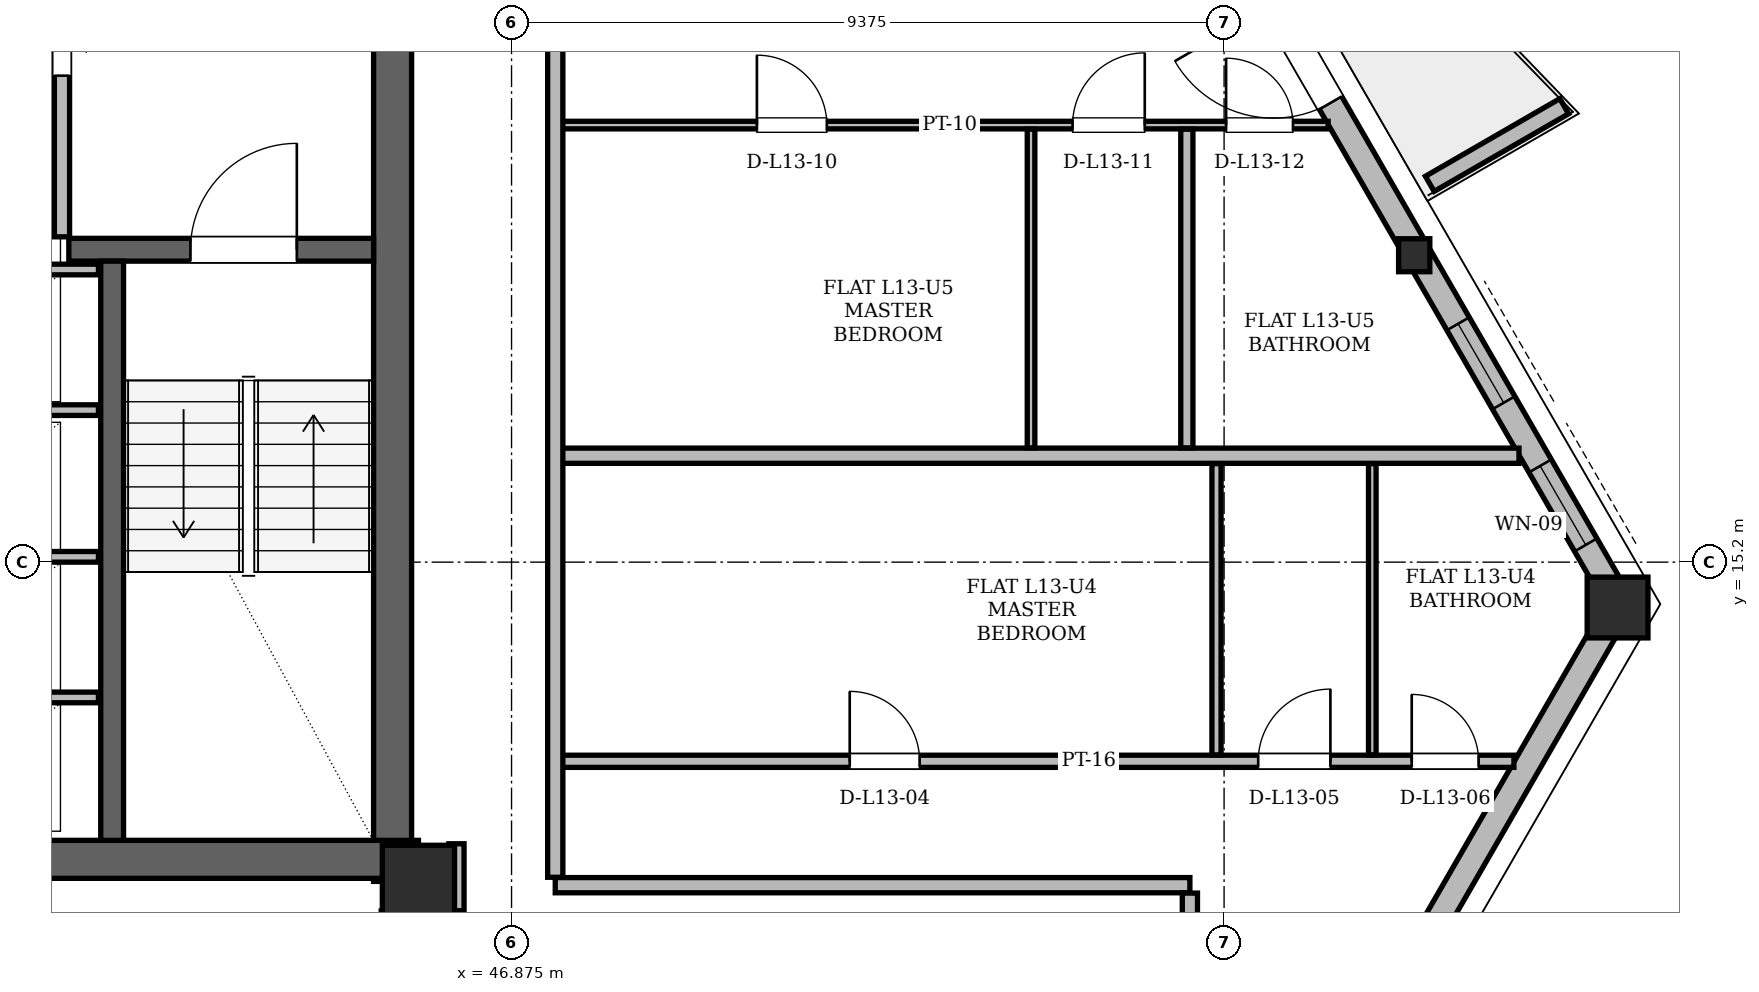
"""IFC4 building model, lengths in metres.
Left out: names, types, materials, properties, quantities, classifications, styles, units other than length and angle.
Written with IfcOpenShell. Run it as: python <this file> out.ifc"""

import sys

from ifc_helpers import new_model, si_unit, direction, frame, frame_2d, origin, origin_2d, place, context, subcontext, project, spatial, polyline, rectangle, hollow_rectangle, i_section, outline, extrude, element, fill, save


model = new_model("IFC4")
c1 = context("Model", 3, precision=1e-05, world=origin(), true_north=direction((0.0, 1.0)))
c2 = subcontext(c1, "Body", "Model", "MODEL_VIEW")
j1 = project(units=[si_unit("LENGTHUNIT", "METRE"), si_unit("PLANEANGLEUNIT", "RADIAN")], contexts=[c1])
p1 = place(None, origin())
s1 = spatial("IfcSite", under=j1, at=p1, CompositionType="ELEMENT")
p2 = place(p1, origin())
s2 = spatial("IfcBuilding", under=s1, at=p2, CompositionType="ELEMENT")
p3 = place(p2, frame((0.0, 0.0, 52.5)))
s3 = spatial("IfcBuildingStorey", under=s2, at=p3, CompositionType="ELEMENT", Elevation=52.5)
p4 = place(p3, frame((45.65, 11.0, 0.0), z_axis=(0.0, 0.0, 1.0), x_axis=(1.0, 0.0, 0.0)))
e1 = element("IfcColumn", 1, at=p4, inside=s3, PredefinedType="COLUMN", context=c2, shape_type="SweptSolid", body=[
    extrude(hollow_rectangle(XDim=0.95, YDim=0.95, WallThickness=0.08, at=origin_2d()), origin(), (0.0, 0.0, 1.0), 3.6),
])
p5 = place(p3, frame((61.458, 14.648, 0.004), z_axis=(-0.017328387348, -0.024803377969, 0.999542154906), x_axis=(0.819759137879, -0.572708438792, 0.0)))
e2 = element("IfcColumn", 2, at=p5, inside=s3, PredefinedType="COLUMN", context=c2, shape_type="SweptSolid", body=[
    extrude(hollow_rectangle(XDim=0.8, YDim=0.8, WallThickness=0.065, at=origin_2d()), origin(), (0.0, 0.0, 1.0), 3.593),
])
p6 = place(p3, frame((58.786, 19.276, 0.004), z_axis=(-0.019435833203, -0.021202727131, 0.999586260785), x_axis=(0.737154140201, -0.675724628517, 0.0)))
e3 = element("IfcColumn", 3, at=p6, inside=s3, PredefinedType="COLUMN", context=c2, shape_type="SweptSolid", body=[
    extrude(i_section(OverallWidth=0.411, OverallDepth=0.434, WebThickness=0.036, FlangeThickness=0.057, at=origin_2d()), origin(), (0.0, 0.0, 1.0), 3.593),
])
p7 = place(p3, frame((45.31, 11.0, 0.0), z_axis=(0.0, 0.0, 1.0), x_axis=(0.0, 1.0, 0.0)))
e4 = element("IfcWall", 4, at=p7, inside=s3, PredefinedType="SHEAR", context=c2, shape_type="SweptSolid", body=[
    extrude(rectangle(XDim=13.3, YDim=0.5, at=frame_2d((6.65, 0.0))), origin(), (0.0, 0.0, 1.0), 3.36),
])
p8 = place(p3, frame((38.55, 11.29, 0.0), z_axis=(0.0, 0.0, 1.0), x_axis=(1.0, 0.0, 0.0)))
e5 = element("IfcWall", 5, at=p8, inside=s3, PredefinedType="SHEAR", context=c2, shape_type="SweptSolid", body=[
    extrude(rectangle(XDim=7.1, YDim=0.5, at=frame_2d((3.55, 0.0))), origin(), (0.0, 0.0, 1.0), 3.36),
])
p9 = place(p3, frame((41.05, 19.31, 0.0), z_axis=(0.0, 0.0, 1.0), x_axis=(1.0, 0.0, 0.0)))
e6 = element("IfcWall", 6, at=p9, inside=s3, PredefinedType="SHEAR", context=c2, shape_type="SweptSolid", body=[
    extrude(rectangle(XDim=4.01, YDim=0.3, at=frame_2d((2.005, 0.0))), origin(), (0.0, 0.0, 1.0), 3.36),
])
p10 = place(p9, frame((1.6, 0.0, 0.0)))
e7 = element("IfcOpeningElement", 7, at=p10, cuts=e6, PredefinedType="OPENING", context=c2, shape_type="SweptSolid", body=[
    extrude(rectangle(XDim=1.4, YDim=2.2, at=frame_2d((0.7, 1.1))), frame((0.0, 0.15, 0.0), z_axis=(0.0, -1.0, 0.0), x_axis=(1.0, 0.0, 0.0)), (0.0, 0.0, 1.0), 0.3),
])
p11 = place(p3, frame((41.62, 11.54, 0.0), z_axis=(0.0, 0.0, 1.0), x_axis=(0.0, 1.0, 0.0)))
e8 = element("IfcWall", 8, at=p11, inside=s3, PredefinedType="SHEAR", context=c2, shape_type="SweptSolid", body=[
    extrude(rectangle(XDim=7.62, YDim=0.3, at=frame_2d((3.81, 0.0))), origin(), (0.0, 0.0, 1.0), 3.36),
])
p12 = place(p3, frame((54.201, 2.078, 0.0), z_axis=(0.0, 0.0, 1.0), x_axis=(0.49999957979, 0.866025646392, 0.0)))
e9 = element("IfcWall", 9, at=p12, inside=s3, PredefinedType="SOLIDWALL", context=c2, shape_type="SweptSolid", body=[
    extrude(rectangle(XDim=14.515, YDim=0.34, at=frame_2d((7.257, 0.0))), origin(), (0.0, 0.0, 1.0), 2.494),
])
p13 = place(p3, frame((61.458, 14.648, 0.0), z_axis=(0.0, 0.0, 1.0), x_axis=(-0.500001264705, 0.866024673605, 0.0)))
e10 = element("IfcWall", 10, at=p13, inside=s3, PredefinedType="SOLIDWALL", context=c2, shape_type="SweptSolid", body=[
    extrude(rectangle(XDim=33.402, YDim=0.34, at=frame_2d((16.701, 0.0))), origin(), (0.0, 0.0, 1.0), 2.494),
])
p14 = place(p13, frame((7.615, 0.0, 0.0)))
e11 = element("IfcOpeningElement", 11, at=p14, cuts=e10, PredefinedType="OPENING", context=c2, shape_type="SweptSolid", body=[
    extrude(rectangle(XDim=1.5, YDim=2.2, at=frame_2d((0.75, 1.1))), frame((0.0, 0.17, 0.0), z_axis=(0.0, -1.0, 0.0), x_axis=(1.0, 0.0, 0.0)), (0.0, 0.0, 1.0), 0.34),
])
p15 = place(p13, frame((24.692, 0.0, 0.0)))
e12 = element("IfcOpeningElement", 12, at=p15, cuts=e10, PredefinedType="OPENING", context=c2, shape_type="SweptSolid", body=[
    extrude(rectangle(XDim=1.5, YDim=2.2, at=frame_2d((0.75, 1.1))), frame((0.0, 0.17, 0.0), z_axis=(0.0, -1.0, 0.0), x_axis=(1.0, 0.0, 0.0)), (0.0, 0.0, 1.0), 0.34),
])
p16 = place(p13, frame((0.899, 0.0, 0.85)))
e13 = element("IfcOpeningElement", 13, at=p16, cuts=e10, PredefinedType="OPENING", context=c2, shape_type="SweptSolid", body=[
    extrude(rectangle(XDim=1.2, YDim=1.48, at=frame_2d((0.6, 0.74))), frame((0.0, 0.17, 0.0), z_axis=(0.0, -1.0, 0.0), x_axis=(1.0, 0.0, 0.0)), (0.0, 0.0, 1.0), 0.34),
])
p17 = place(p13, frame((10.882, 0.0, 0.85)))
e14 = element("IfcOpeningElement", 14, at=p17, cuts=e10, PredefinedType="OPENING", context=c2, shape_type="SweptSolid", body=[
    extrude(rectangle(XDim=1.6, YDim=1.534, at=frame_2d((0.8, 0.767))), frame((0.0, 0.17, 0.0), z_axis=(0.0, -1.0, 0.0), x_axis=(1.0, 0.0, 0.0)), (0.0, 0.0, 1.0), 0.34),
])
p18 = place(p13, frame((18.551, 0.0, 0.85)))
e15 = element("IfcOpeningElement", 15, at=p18, cuts=e10, PredefinedType="OPENING", context=c2, shape_type="SweptSolid", body=[
    extrude(rectangle(XDim=3.0, YDim=1.534, at=frame_2d((1.5, 0.767))), frame((0.0, 0.17, 0.0), z_axis=(0.0, -1.0, 0.0), x_axis=(1.0, 0.0, 0.0)), (0.0, 0.0, 1.0), 0.34),
])
p19 = place(p13, frame((3.059, 0.0, 0.85)))
e16 = element("IfcOpeningElement", 16, at=p19, cuts=e10, PredefinedType="OPENING", context=c2, shape_type="SweptSolid", body=[
    extrude(rectangle(XDim=1.2, YDim=1.48, at=frame_2d((0.6, 0.74))), frame((0.0, 0.17, 0.0), z_axis=(0.0, -1.0, 0.0), x_axis=(1.0, 0.0, 0.0)), (0.0, 0.0, 1.0), 0.34),
])
p20 = place(p3, frame((58.956, 20.177, 0.0), z_axis=(0.0, 0.0, 1.0), x_axis=(0.866042246008, 0.499970827278, 0.0)))
e17 = element("IfcWall", 17, at=p20, inside=s3, PredefinedType="PARAPET", context=c2, shape_type="SweptSolid", body=[
    extrude(outline(polyline([(0.0, 0.0), (2.042, 0.0), (2.042, 1.1), (0.0, 1.32), (0.0, 0.0)])), frame((0.0, 0.115, 0.0), z_axis=(0.0, -1.0, 0.0), x_axis=(1.0, 0.0, 0.0)), (0.0, 0.0, 1.0), 0.23),
])
p21 = place(p3, frame((40.96, 19.48, 0.0), z_axis=(0.0, 0.0, 1.0), x_axis=(0.0, 1.0, 0.0)))
e18 = element("IfcWall", 18, at=p21, inside=s3, PredefinedType="PARTITIONING", context=c2, shape_type="SweptSolid", body=[
    extrude(rectangle(XDim=4.5, YDim=0.2, at=frame_2d((2.25, 0.0))), origin(), (0.0, 0.0, 1.0), 2.4),
])
p22 = place(p21, frame((2.12, 0.0, 0.0)))
e19 = element("IfcOpeningElement", 19, at=p22, cuts=e18, PredefinedType="OPENING", context=c2, shape_type="SweptSolid", body=[
    extrude(rectangle(XDim=1.1, YDim=2.2, at=frame_2d((0.55, 1.1))), frame((0.0, 0.1, 0.0), z_axis=(0.0, -1.0, 0.0), x_axis=(1.0, 0.0, 0.0)), (0.0, 0.0, 1.0), 0.2),
])
p23 = place(p3, frame((39.26, 20.86, 0.0), z_axis=(0.0, 0.0, 1.0), x_axis=(1.0, 0.0, 0.0)))
e20 = element("IfcWall", 20, at=p23, inside=s3, PredefinedType="PARTITIONING", context=c2, shape_type="SweptSolid", body=[
    extrude(rectangle(XDim=1.58, YDim=0.18, at=frame_2d((0.79, 0.0))), origin(), (0.0, 0.0, 1.0), 3.36),
])
for number, where, z_axis, x_axis in (
    (21, (38.78, 13.42, 0.0), (0.0, 0.0, 1.0), (1.0, 0.0, 0.0)),
    (22, (38.78, 15.27, 0.0), (0.0, 0.0, 1.0), (1.0, 0.0, 0.0)),
    (23, (38.78, 17.2, 0.0), (0.0, 0.0, 1.0), (1.0, 0.0, 0.0)),
    (24, (38.78, 19.05, 0.0), (0.0, 0.0, 1.0), (1.0, 0.0, 0.0)),
):
    element("IfcWall", number, at=place(p3, frame(where, z_axis=z_axis, x_axis=x_axis)), inside=s3, PredefinedType="PARTITIONING", context=c2, shape_type="SweptSolid", body=[
        extrude(rectangle(XDim=2.66, YDim=0.14, at=frame_2d((1.33, 0.0))), origin(), (0.0, 0.0, 1.0), 3.36),
    ])
p24 = place(p3, frame((45.16, 10.51, 0.0), z_axis=(0.0, 0.0, 1.0), x_axis=(1.0, 0.0, 0.0)))
e25 = element("IfcWall", 25, at=p24, inside=s3, PredefinedType="PARTITIONING", context=c2, shape_type="SweptSolid", body=[
    extrude(rectangle(XDim=0.98, YDim=0.2, at=frame_2d((0.49, 0.0))), origin(), (0.0, 0.0, 1.0), 2.738),
])
p25 = place(p3, frame((47.45, 10.95, 0.0), z_axis=(0.0, 0.0, 1.0), x_axis=(1.0, 0.0, 0.0)))
e26 = element("IfcWall", 26, at=p25, inside=s3, PredefinedType="PARTITIONING", context=c2, shape_type="SweptSolid", body=[
    extrude(rectangle(XDim=8.35, YDim=0.2, at=frame_2d((4.175, 0.0))), origin(), (0.0, 0.0, 1.0), 3.36),
])
p26 = place(p3, frame((47.4, 12.58, 0.0), z_axis=(0.0, 0.0, 1.0), x_axis=(1.0, 0.0, 0.0)))
e27 = element("IfcWall", 27, at=p26, inside=s3, PredefinedType="PARTITIONING", context=c2, shape_type="SweptSolid", body=[
    extrude(rectangle(XDim=12.664, YDim=0.16, at=frame_2d((6.332, 0.0))), origin(), (0.0, 0.0, 1.0), 2.738),
])
p27 = place(p26, frame((3.924, 0.0, 0.0)))
e28 = element("IfcOpeningElement", 28, at=p27, cuts=e27, PredefinedType="OPENING", context=c2, shape_type="SweptSolid", body=[
    extrude(rectangle(XDim=0.92, YDim=2.12, at=frame_2d((0.46, 1.06))), frame((0.0, 0.08, 0.0), z_axis=(0.0, -1.0, 0.0), x_axis=(1.0, 0.0, 0.0)), (0.0, 0.0, 1.0), 0.16),
])
p28 = place(p26, frame((9.299, 0.0, 0.0)))
e29 = element("IfcOpeningElement", 29, at=p28, cuts=e27, PredefinedType="OPENING", context=c2, shape_type="SweptSolid", body=[
    extrude(rectangle(XDim=0.95, YDim=2.1, at=frame_2d((0.475, 1.05))), frame((0.0, 0.08, 0.0), z_axis=(0.0, -1.0, 0.0), x_axis=(1.0, 0.0, 0.0)), (0.0, 0.0, 1.0), 0.16),
])
p29 = place(p26, frame((11.319, 0.0, 0.0)))
e30 = element("IfcOpeningElement", 30, at=p29, cuts=e27, PredefinedType="OPENING", context=c2, shape_type="SweptSolid", body=[
    extrude(rectangle(XDim=0.88, YDim=2.08, at=frame_2d((0.44, 1.04))), frame((0.0, 0.08, 0.0), z_axis=(0.0, -1.0, 0.0), x_axis=(1.0, 0.0, 0.0)), (0.0, 0.0, 1.0), 0.16),
])
p30 = place(p3, frame((47.45, 16.6, 0.0), z_axis=(0.0, 0.0, 1.0), x_axis=(1.0, 0.0, 0.0)))
e31 = element("IfcWall", 31, at=p30, inside=s3, PredefinedType="PARTITIONING", context=c2, shape_type="SweptSolid", body=[
    extrude(rectangle(XDim=12.68, YDim=0.2, at=frame_2d((6.34, 0.0))), origin(), (0.0, 0.0, 1.0), 2.494),
])
p31 = place(p3, frame((47.4, 20.95, 0.0), z_axis=(0.0, 0.0, 1.0), x_axis=(1.0, 0.0, 0.0)))
e32 = element("IfcWall", 32, at=p31, inside=s3, PredefinedType="PARTITIONING", context=c2, shape_type="SweptSolid", body=[
    extrude(rectangle(XDim=10.219, YDim=0.1, at=frame_2d((5.109, 0.0))), origin(), (0.0, 0.0, 1.0), 3.36),
])
p32 = place(p31, frame((2.703, 0.0, 0.0)))
e33 = element("IfcOpeningElement", 33, at=p32, cuts=e32, PredefinedType="OPENING", context=c2, shape_type="SweptSolid", body=[
    extrude(rectangle(XDim=0.92, YDim=2.12, at=frame_2d((0.46, 1.06))), frame((0.0, 0.05, 0.0), z_axis=(0.0, -1.0, 0.0), x_axis=(1.0, 0.0, 0.0)), (0.0, 0.0, 1.0), 0.1),
])
p33 = place(p31, frame((6.856, 0.0, 0.0)))
e34 = element("IfcOpeningElement", 34, at=p33, cuts=e32, PredefinedType="OPENING", context=c2, shape_type="SweptSolid", body=[
    extrude(rectangle(XDim=0.95, YDim=2.1, at=frame_2d((0.475, 1.05))), frame((0.0, 0.05, 0.0), z_axis=(0.0, -1.0, 0.0), x_axis=(1.0, 0.0, 0.0)), (0.0, 0.0, 1.0), 0.1),
])
p34 = place(p31, frame((8.876, 0.0, 0.0)))
e35 = element("IfcOpeningElement", 35, at=p34, cuts=e32, PredefinedType="OPENING", context=c2, shape_type="SweptSolid", body=[
    extrude(rectangle(XDim=0.88, YDim=2.08, at=frame_2d((0.44, 1.04))), frame((0.0, 0.05, 0.0), z_axis=(0.0, -1.0, 0.0), x_axis=(1.0, 0.0, 0.0)), (0.0, 0.0, 1.0), 0.1),
])
p35 = place(p3, frame((46.15, 10.614, 0.0), z_axis=(0.0, 0.0, 1.0), x_axis=(0.0, 1.0, 0.0)))
e36 = element("IfcWall", 36, at=p35, inside=s3, PredefinedType="PARTITIONING", context=c2, shape_type="SweptSolid", body=[
    extrude(rectangle(XDim=0.881, YDim=0.2, at=frame_2d((0.44, 0.0))), origin(), (0.0, 0.0, 1.0), 2.738),
])
p36 = place(p3, frame((47.45, 11.054, 0.0), z_axis=(0.0, 0.0, 1.0), x_axis=(0.0, 1.0, 0.0)))
e37 = element("IfcWall", 37, at=p36, inside=s3, PredefinedType="PARTITIONING", context=c2, shape_type="SweptSolid", body=[
    extrude(rectangle(XDim=27.509, YDim=0.2, at=frame_2d((13.754, 0.0))), origin(), (0.0, 0.0, 1.0), 2.494),
])
p37 = place(p36, frame((10.989, 0.0, 0.0)))
e38 = element("IfcOpeningElement", 38, at=p37, cuts=e37, PredefinedType="OPENING", context=c2, shape_type="SweptSolid", body=[
    extrude(rectangle(XDim=1.0, YDim=2.18, at=frame_2d((0.5, 1.09))), frame((0.0, 0.1, 0.0), z_axis=(0.0, -1.0, 0.0), x_axis=(1.0, 0.0, 0.0)), (0.0, 0.0, 1.0), 0.2),
])
p38 = place(p3, frame((53.71, 16.704, 0.0), z_axis=(0.0, 0.0, 1.0), x_axis=(0.0, 1.0, 0.0)))
e39 = element("IfcWall", 39, at=p38, inside=s3, PredefinedType="PARTITIONING", context=c2, shape_type="SweptSolid", body=[
    extrude(rectangle(XDim=4.192, YDim=0.1, at=frame_2d((2.096, 0.0))), origin(), (0.0, 0.0, 1.0), 3.36),
])
p39 = place(p3, frame((55.76, 16.704, 0.0), z_axis=(0.0, 0.0, 1.0), x_axis=(0.0, 1.0, 0.0)))
e40 = element("IfcWall", 40, at=p39, inside=s3, PredefinedType="PARTITIONING", context=c2, shape_type="SweptSolid", body=[
    extrude(rectangle(XDim=4.192, YDim=0.16, at=frame_2d((2.096, 0.0))), origin(), (0.0, 0.0, 1.0), 2.946),
])
p40 = place(p3, frame((55.8, 9.404, 0.0), z_axis=(0.0, 0.0, 1.0), x_axis=(0.0, 1.0, 0.0)))
e41 = element("IfcWall", 41, at=p40, inside=s3, PredefinedType="PARTITIONING", context=c2, shape_type="SweptSolid", body=[
    extrude(rectangle(XDim=1.442, YDim=0.2, at=frame_2d((0.721, 0.0))), origin(), (0.0, 0.0, 1.0), 3.36),
])
p41 = place(p3, frame((56.15, 12.664, 0.0), z_axis=(0.0, 0.0, 1.0), x_axis=(0.0, 1.0, 0.0)))
e42 = element("IfcWall", 42, at=p41, inside=s3, PredefinedType="PARTITIONING", context=c2, shape_type="SweptSolid", body=[
    extrude(rectangle(XDim=3.832, YDim=0.12, at=frame_2d((1.916, 0.0))), origin(), (0.0, 0.0, 1.0), 2.738),
])
p42 = place(p3, frame((58.2, 12.664, 0.0), z_axis=(0.0, 0.0, 1.0), x_axis=(0.0, 1.0, 0.0)))
e43 = element("IfcWall", 43, at=p42, inside=s3, PredefinedType="PARTITIONING", context=c2, shape_type="SweptSolid", body=[
    extrude(rectangle(XDim=3.832, YDim=0.1, at=frame_2d((1.916, 0.0))), origin(), (0.0, 0.0, 1.0), 2.738),
])
p43 = place(p14, origin())
e44 = element("IfcDoor", 44, at=p43, inside=s3, OperationType="SINGLE_SWING_RIGHT", PredefinedType="DOOR", context=c2, shape_type="SweptSolid", body=[
    extrude(rectangle(XDim=1.5, YDim=2.2, at=frame_2d((0.75, 1.1))), frame((0.0, 0.025, 0.0), z_axis=(0.0, -1.0, 0.0), x_axis=(1.0, 0.0, 0.0)), (0.0, 0.0, 1.0), 0.05),
])
fill(e11, e44)
p44 = place(p16, origin())
e45 = element("IfcWindow", 45, at=p44, inside=s3, PartitioningType="SINGLE_PANEL", PredefinedType="WINDOW", context=c2, shape_type="SweptSolid", body=[
    extrude(rectangle(XDim=1.2, YDim=1.48, at=frame_2d((0.6, 0.74))), frame((0.0, 0.03, 0.0), z_axis=(0.0, -1.0, 0.0), x_axis=(1.0, 0.0, 0.0)), (0.0, 0.0, 1.0), 0.06),
])
fill(e13, e45)
p45 = place(p19, origin())
e46 = element("IfcWindow", 46, at=p45, inside=s3, PartitioningType="SINGLE_PANEL", PredefinedType="WINDOW", context=c2, shape_type="SweptSolid", body=[
    extrude(rectangle(XDim=1.2, YDim=1.48, at=frame_2d((0.6, 0.74))), frame((0.0, 0.03, 0.0), z_axis=(0.0, -1.0, 0.0), x_axis=(1.0, 0.0, 0.0)), (0.0, 0.0, 1.0), 0.06),
])
fill(e16, e46)
p46 = place(p22, origin())
e47 = element("IfcDoor", 47, at=p46, inside=s3, OperationType="SLIDING_TO_RIGHT", PredefinedType="DOOR", context=c2, shape_type="SweptSolid", body=[
    extrude(rectangle(XDim=1.1, YDim=2.2, at=frame_2d((0.55, 1.1))), frame((0.0, 0.025, 0.0), z_axis=(0.0, -1.0, 0.0), x_axis=(1.0, 0.0, 0.0)), (0.0, 0.0, 1.0), 0.05),
])
fill(e19, e47)
p47 = place(p10, origin())
e48 = element("IfcDoor", 48, at=p47, inside=s3, OperationType="SINGLE_SWING_RIGHT", PredefinedType="DOOR", context=c2, shape_type="SweptSolid", body=[
    extrude(rectangle(XDim=1.4, YDim=2.2, at=frame_2d((0.7, 1.1))), frame((0.0, 0.025, 0.0), z_axis=(0.0, -1.0, 0.0), x_axis=(1.0, 0.0, 0.0)), (0.0, 0.0, 1.0), 0.05),
])
fill(e7, e48)
p48 = place(p27, origin())
e49 = element("IfcDoor", 49, at=p48, inside=s3, OperationType="SINGLE_SWING_LEFT", PredefinedType="DOOR", context=c2, shape_type="SweptSolid", body=[
    extrude(rectangle(XDim=0.92, YDim=2.12, at=frame_2d((0.46, 1.06))), frame((0.0, 0.025, 0.0), z_axis=(0.0, -1.0, 0.0), x_axis=(1.0, 0.0, 0.0)), (0.0, 0.0, 1.0), 0.05),
])
fill(e28, e49)
p49 = place(p28, origin())
e50 = element("IfcDoor", 50, at=p49, inside=s3, OperationType="SINGLE_SWING_RIGHT", PredefinedType="DOOR", context=c2, shape_type="SweptSolid", body=[
    extrude(rectangle(XDim=0.95, YDim=2.1, at=frame_2d((0.475, 1.05))), frame((0.0, 0.025, 0.0), z_axis=(0.0, -1.0, 0.0), x_axis=(1.0, 0.0, 0.0)), (0.0, 0.0, 1.0), 0.05),
])
fill(e29, e50)
p50 = place(p29, origin())
e51 = element("IfcDoor", 51, at=p50, inside=s3, OperationType="SINGLE_SWING_LEFT", PredefinedType="DOOR", context=c2, shape_type="SweptSolid", body=[
    extrude(rectangle(XDim=0.88, YDim=2.08, at=frame_2d((0.44, 1.04))), frame((0.0, 0.025, 0.0), z_axis=(0.0, -1.0, 0.0), x_axis=(1.0, 0.0, 0.0)), (0.0, 0.0, 1.0), 0.05),
])
fill(e30, e51)
p51 = place(p32, origin())
e52 = element("IfcDoor", 52, at=p51, inside=s3, OperationType="SINGLE_SWING_LEFT", PredefinedType="DOOR", context=c2, shape_type="SweptSolid", body=[
    extrude(rectangle(XDim=0.92, YDim=2.12, at=frame_2d((0.46, 1.06))), frame((0.0, 0.025, 0.0), z_axis=(0.0, -1.0, 0.0), x_axis=(1.0, 0.0, 0.0)), (0.0, 0.0, 1.0), 0.05),
])
fill(e33, e52)
p52 = place(p33, origin())
e53 = element("IfcDoor", 53, at=p52, inside=s3, OperationType="SINGLE_SWING_RIGHT", PredefinedType="DOOR", context=c2, shape_type="SweptSolid", body=[
    extrude(rectangle(XDim=0.95, YDim=2.1, at=frame_2d((0.475, 1.05))), frame((0.0, 0.025, 0.0), z_axis=(0.0, -1.0, 0.0), x_axis=(1.0, 0.0, 0.0)), (0.0, 0.0, 1.0), 0.05),
])
fill(e34, e53)
p53 = place(p34, origin())
e54 = element("IfcDoor", 54, at=p53, inside=s3, OperationType="SINGLE_SWING_LEFT", PredefinedType="DOOR", context=c2, shape_type="SweptSolid", body=[
    extrude(rectangle(XDim=0.88, YDim=2.08, at=frame_2d((0.44, 1.04))), frame((0.0, 0.025, 0.0), z_axis=(0.0, -1.0, 0.0), x_axis=(1.0, 0.0, 0.0)), (0.0, 0.0, 1.0), 0.05),
])
fill(e35, e54)
save(model, sys.argv[1])
